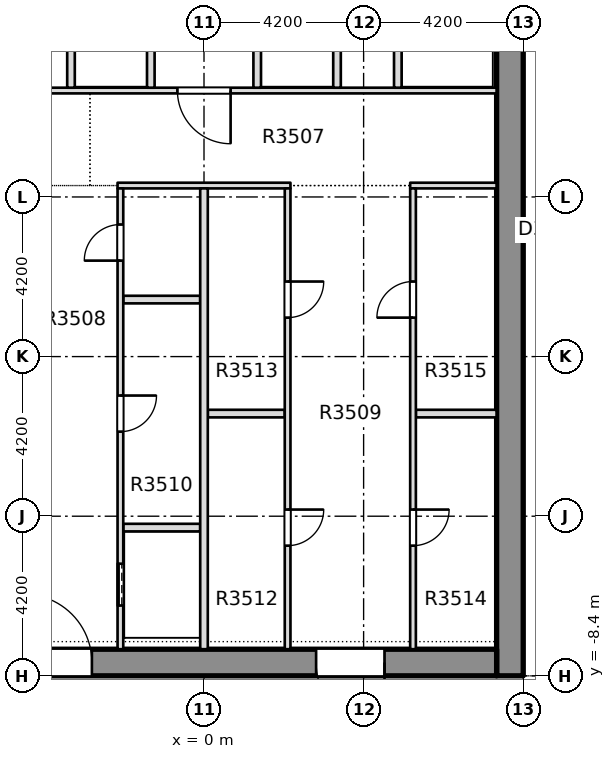
"""IFC4 building model, lengths in metres.
Left out: names, types, materials, properties, quantities, classifications, styles, units other than length and angle.
Written with IfcOpenShell. Run it as: python <this file> out.ifc"""

import sys

from ifc_helpers import new_model, si_unit, direction, frame, frame_2d, origin, place, context, subcontext, project, spatial, rectangle, extrude, element, fill, save


model = new_model("IFC4")
c1 = context("Model", 3, precision=1e-05, world=origin(), true_north=direction((0.0, 1.0)))
c2 = subcontext(c1, "Body", "Model", "MODEL_VIEW")
j1 = project(units=[si_unit("LENGTHUNIT", "METRE"), si_unit("PLANEANGLEUNIT", "RADIAN")], contexts=[c1])
p1 = place(None, origin())
s1 = spatial("IfcSite", under=j1, at=p1, CompositionType="ELEMENT")
p2 = place(p1, origin())
s2 = spatial("IfcBuilding", under=s1, at=p2, CompositionType="ELEMENT")
p3 = place(p2, frame((0.0, 0.0, 140.0)))
s3 = spatial("IfcBuildingStorey", under=s2, at=p3, CompositionType="ELEMENT", Elevation=140.0)
p4 = place(p3, frame((8.05, -8.4, -0.4), z_axis=(0.0, 0.0, 1.0), x_axis=(0.0, 1.0, 0.0)))
e1 = element("IfcWall", 1, at=p4, inside=s3, PredefinedType="SOLIDWALL", context=c2, shape_type="SweptSolid", body=[
    extrude(rectangle(XDim=30.15, YDim=0.7, at=frame_2d((15.075, 0.0))), origin(), (0.0, 0.0, 1.0), 3.45),
])
p5 = place(p4, frame((19.3, 0.0, 0.4)))
e2 = element("IfcOpeningElement", 2, at=p5, cuts=e1, PredefinedType="OPENING", context=c2, shape_type="SweptSolid", body=[
    extrude(rectangle(XDim=1.2, YDim=2.1, at=frame_2d((0.6, 1.05))), frame((0.0, 0.36, 0.0), z_axis=(0.0, -1.0, 0.0), x_axis=(1.0, 0.0, 0.0)), (0.0, 0.0, 1.0), 0.72),
])
p6 = place(p3, frame((-7.7, -8.05, -0.4), z_axis=(0.0, 0.0, 1.0), x_axis=(1.0, 0.0, 0.0)))
e3 = element("IfcWall", 3, at=p6, inside=s3, PredefinedType="SHEAR", context=c2, shape_type="SweptSolid", body=[
    extrude(rectangle(XDim=15.4, YDim=0.7, at=frame_2d((7.7, 0.0))), origin(), (0.0, 0.0, 1.0), 3.45),
])
p7 = place(p6, frame((2.95, 0.0, 0.4)))
e4 = element("IfcOpeningElement", 4, at=p7, cuts=e3, PredefinedType="OPENING", context=c2, shape_type="SweptSolid", body=[
    extrude(rectangle(XDim=1.8, YDim=2.1, at=frame_2d((0.9, 1.05))), frame((0.0, 0.36, 0.0), z_axis=(0.0, -1.0, 0.0), x_axis=(1.0, 0.0, 0.0)), (0.0, 0.0, 1.0), 0.72),
])
p8 = place(p6, frame((10.65, 0.0, 0.4)))
e5 = element("IfcOpeningElement", 5, at=p8, cuts=e3, PredefinedType="OPENING", context=c2, shape_type="SweptSolid", body=[
    extrude(rectangle(XDim=1.8, YDim=2.1, at=frame_2d((0.9, 1.05))), frame((0.0, 0.36, 0.0), z_axis=(0.0, -1.0, 0.0), x_axis=(1.0, 0.0, 0.0)), (0.0, 0.0, 1.0), 0.72),
])
for number, where, z_axis, x_axis in (
    (6, (-2.125, -4.5, 0.0), (0.0, 0.0, 1.0), (1.0, 0.0, 0.0)),
    (7, (0.1, -1.5, 0.0), (0.0, 0.0, 1.0), (1.0, 0.0, 0.0)),
):
    element("IfcWall", number, at=place(p3, frame(where, z_axis=z_axis, x_axis=x_axis)), inside=s3, PredefinedType="PARTITIONING", context=c2, shape_type="SweptSolid", body=[
        extrude(rectangle(XDim=2.025, YDim=0.2, at=frame_2d((1.012, 0.0))), origin(), (0.0, 0.0, 1.0), 3.05),
    ])
p9 = place(p3, frame((5.575, -1.5, 0.0), z_axis=(0.0, 0.0, 1.0), x_axis=(1.0, 0.0, 0.0)))
e8 = element("IfcWall", 8, at=p9, inside=s3, PredefinedType="PARTITIONING", context=c2, shape_type="SweptSolid", body=[
    extrude(rectangle(XDim=2.124, YDim=0.2, at=frame_2d((1.062, 0.0))), origin(), (0.0, 0.0, 1.0), 3.05),
])
p10 = place(p3, frame((-2.125, 1.5, 0.0), z_axis=(0.0, 0.0, 1.0), x_axis=(1.0, 0.0, 0.0)))
e9 = element("IfcWall", 9, at=p10, inside=s3, PredefinedType="PARTITIONING", context=c2, shape_type="SweptSolid", body=[
    extrude(rectangle(XDim=2.025, YDim=0.2, at=frame_2d((1.012, 0.0))), origin(), (0.0, 0.0, 1.0), 3.05),
])
p11 = place(p3, frame((-2.275, 4.5, 0.0), z_axis=(0.0, 0.0, 1.0), x_axis=(1.0, 0.0, 0.0)))
e10 = element("IfcWall", 10, at=p11, inside=s3, PredefinedType="PARTITIONING", context=c2, shape_type="SweptSolid", body=[
    extrude(rectangle(XDim=4.55, YDim=0.15, at=frame_2d((2.275, 0.0))), origin(), (0.0, 0.0, 1.0), 3.05),
])
p12 = place(p3, frame((5.425, 4.5, 0.0), z_axis=(0.0, 0.0, 1.0), x_axis=(1.0, 0.0, 0.0)))
e11 = element("IfcWall", 11, at=p12, inside=s3, PredefinedType="PARTITIONING", context=c2, shape_type="SweptSolid", body=[
    extrude(rectangle(XDim=2.274, YDim=0.15, at=frame_2d((1.137, 0.0))), origin(), (0.0, 0.0, 1.0), 3.05),
])
p13 = place(p3, frame((-7.699, 7.0, 0.0), z_axis=(0.0, 0.0, 1.0), x_axis=(1.0, 0.0, 0.0)))
e12 = element("IfcWall", 12, at=p13, inside=s3, PredefinedType="PARTITIONING", context=c2, shape_type="SweptSolid", body=[
    extrude(rectangle(XDim=15.398, YDim=0.15, at=frame_2d((7.699, 0.0))), origin(), (0.0, 0.0, 1.0), 3.05),
])
p14 = place(p13, frame((6.999, 0.0, 0.0)))
e13 = element("IfcOpeningElement", 13, at=p14, cuts=e12, PredefinedType="OPENING", context=c2, shape_type="SweptSolid", body=[
    extrude(rectangle(XDim=1.4, YDim=2.1, at=frame_2d((0.7, 1.05))), frame((0.0, 0.085, 0.0), z_axis=(0.0, -1.0, 0.0), x_axis=(1.0, 0.0, 0.0)), (0.0, 0.0, 1.0), 0.17),
])
p15 = place(p3, frame((-3.5, 7.075, 0.0), z_axis=(0.0, 0.0, 1.0), x_axis=(0.0, 1.0, 0.0)))
e14 = element("IfcWall", 14, at=p15, inside=s3, PredefinedType="PARTITIONING", context=c2, shape_type="SweptSolid", body=[
    extrude(rectangle(XDim=2.85, YDim=0.2, at=frame_2d((1.425, 0.0))), origin(), (0.0, 0.0, 1.0), 3.05),
])
p16 = place(p3, frame((-2.2, -7.699, 0.0), z_axis=(0.0, 0.0, 1.0), x_axis=(0.0, 1.0, 0.0)))
e15 = element("IfcWall", 15, at=p16, inside=s3, PredefinedType="PARTITIONING", context=c2, shape_type="SweptSolid", body=[
    extrude(rectangle(XDim=12.124, YDim=0.15, at=frame_2d((6.062, 0.0))), origin(), (0.0, 0.0, 1.0), 3.05),
])
p17 = place(p16, frame((1.149, 0.0, 0.0)))
e16 = element("IfcOpeningElement", 16, at=p17, cuts=e15, PredefinedType="OPENING", context=c2, shape_type="SweptSolid", body=[
    extrude(rectangle(XDim=1.1, YDim=2.1, at=frame_2d((0.55, 1.05))), frame((0.0, 0.085, 0.0), z_axis=(0.0, -1.0, 0.0), x_axis=(1.0, 0.0, 0.0)), (0.0, 0.0, 1.0), 0.17),
])
p18 = place(p16, frame((5.724, 0.0, 0.0)))
e17 = element("IfcOpeningElement", 17, at=p18, cuts=e15, PredefinedType="OPENING", context=c2, shape_type="SweptSolid", body=[
    extrude(rectangle(XDim=0.95, YDim=2.1, at=frame_2d((0.475, 1.05))), frame((0.0, 0.085, 0.0), z_axis=(0.0, -1.0, 0.0), x_axis=(1.0, 0.0, 0.0)), (0.0, 0.0, 1.0), 0.17),
])
p19 = place(p16, frame((10.224, 0.0, 0.0)))
e18 = element("IfcOpeningElement", 18, at=p19, cuts=e15, PredefinedType="OPENING", context=c2, shape_type="SweptSolid", body=[
    extrude(rectangle(XDim=0.95, YDim=2.1, at=frame_2d((0.475, 1.05))), frame((0.0, 0.085, 0.0), z_axis=(0.0, -1.0, 0.0), x_axis=(1.0, 0.0, 0.0)), (0.0, 0.0, 1.0), 0.17),
])
p20 = place(p3, frame((-1.4, 7.075, 0.0), z_axis=(0.0, 0.0, 1.0), x_axis=(0.0, 1.0, 0.0)))
e19 = element("IfcWall", 19, at=p20, inside=s3, PredefinedType="PARTITIONING", context=c2, shape_type="SweptSolid", body=[
    extrude(rectangle(XDim=2.85, YDim=0.2, at=frame_2d((1.425, 0.0))), origin(), (0.0, 0.0, 1.0), 3.05),
])
p21 = place(p3, frame((0.0, -7.699, 0.0), z_axis=(0.0, 0.0, 1.0), x_axis=(0.0, 1.0, 0.0)))
e20 = element("IfcWall", 20, at=p21, inside=s3, PredefinedType="PARTITIONING", context=c2, shape_type="SweptSolid", body=[
    extrude(rectangle(XDim=12.124, YDim=0.2, at=frame_2d((6.062, 0.0))), origin(), (0.0, 0.0, 1.0), 3.05),
])
p22 = place(p3, frame((1.4, 7.075, 0.0), z_axis=(0.0, 0.0, 1.0), x_axis=(0.0, 1.0, 0.0)))
e21 = element("IfcWall", 21, at=p22, inside=s3, PredefinedType="PARTITIONING", context=c2, shape_type="SweptSolid", body=[
    extrude(rectangle(XDim=2.85, YDim=0.2, at=frame_2d((1.425, 0.0))), origin(), (0.0, 0.0, 1.0), 3.05),
])
p23 = place(p3, frame((2.2, -7.699, 0.0), z_axis=(0.0, 0.0, 1.0), x_axis=(0.0, 1.0, 0.0)))
e22 = element("IfcWall", 22, at=p23, inside=s3, PredefinedType="PARTITIONING", context=c2, shape_type="SweptSolid", body=[
    extrude(rectangle(XDim=12.124, YDim=0.15, at=frame_2d((6.062, 0.0))), origin(), (0.0, 0.0, 1.0), 3.05),
])
p24 = place(p23, frame((2.724, 0.0, 0.0)))
e23 = element("IfcOpeningElement", 23, at=p24, cuts=e22, PredefinedType="OPENING", context=c2, shape_type="SweptSolid", body=[
    extrude(rectangle(XDim=0.95, YDim=2.1, at=frame_2d((0.475, 1.05))), frame((0.0, 0.085, 0.0), z_axis=(0.0, -1.0, 0.0), x_axis=(1.0, 0.0, 0.0)), (0.0, 0.0, 1.0), 0.17),
])
p25 = place(p23, frame((8.724, 0.0, 0.0)))
e24 = element("IfcOpeningElement", 24, at=p25, cuts=e22, PredefinedType="OPENING", context=c2, shape_type="SweptSolid", body=[
    extrude(rectangle(XDim=0.95, YDim=2.1, at=frame_2d((0.475, 1.05))), frame((0.0, 0.085, 0.0), z_axis=(0.0, -1.0, 0.0), x_axis=(1.0, 0.0, 0.0)), (0.0, 0.0, 1.0), 0.17),
])
p26 = place(p3, frame((3.5, 7.075, 0.0), z_axis=(0.0, 0.0, 1.0), x_axis=(0.0, 1.0, 0.0)))
e25 = element("IfcWall", 25, at=p26, inside=s3, PredefinedType="PARTITIONING", context=c2, shape_type="SweptSolid", body=[
    extrude(rectangle(XDim=2.85, YDim=0.2, at=frame_2d((1.425, 0.0))), origin(), (0.0, 0.0, 1.0), 3.05),
])
p27 = place(p3, frame((5.1, 7.075, 0.0), z_axis=(0.0, 0.0, 1.0), x_axis=(0.0, 1.0, 0.0)))
e26 = element("IfcWall", 26, at=p27, inside=s3, PredefinedType="PARTITIONING", context=c2, shape_type="SweptSolid", body=[
    extrude(rectangle(XDim=2.725, YDim=0.2, at=frame_2d((1.363, 0.0))), origin(), (0.0, 0.0, 1.0), 3.05),
])
p28 = place(p3, frame((5.5, -7.699, 0.0), z_axis=(0.0, 0.0, 1.0), x_axis=(0.0, 1.0, 0.0)))
e27 = element("IfcWall", 27, at=p28, inside=s3, PredefinedType="PARTITIONING", context=c2, shape_type="SweptSolid", body=[
    extrude(rectangle(XDim=12.124, YDim=0.15, at=frame_2d((6.062, 0.0))), origin(), (0.0, 0.0, 1.0), 3.05),
])
p29 = place(p28, frame((2.724, 0.0, 0.0)))
e28 = element("IfcOpeningElement", 28, at=p29, cuts=e27, PredefinedType="OPENING", context=c2, shape_type="SweptSolid", body=[
    extrude(rectangle(XDim=0.95, YDim=2.1, at=frame_2d((0.475, 1.05))), frame((0.0, 0.085, 0.0), z_axis=(0.0, -1.0, 0.0), x_axis=(1.0, 0.0, 0.0)), (0.0, 0.0, 1.0), 0.17),
])
p30 = place(p28, frame((8.724, 0.0, 0.0)))
e29 = element("IfcOpeningElement", 29, at=p30, cuts=e27, PredefinedType="OPENING", context=c2, shape_type="SweptSolid", body=[
    extrude(rectangle(XDim=0.95, YDim=2.1, at=frame_2d((0.475, 1.05))), frame((0.0, 0.085, 0.0), z_axis=(0.0, -1.0, 0.0), x_axis=(1.0, 0.0, 0.0)), (0.0, 0.0, 1.0), 0.17),
])
p31 = place(p17, origin())
e30 = element("IfcDoor", 30, at=p31, inside=s3, OperationType="SLIDING_TO_LEFT", PredefinedType="DOOR", context=c2, shape_type="SweptSolid", body=[
    extrude(rectangle(XDim=1.1, YDim=2.1, at=frame_2d((0.55, 1.05))), frame((0.0, 0.025, 0.0), z_axis=(0.0, -1.0, 0.0), x_axis=(1.0, 0.0, 0.0)), (0.0, 0.0, 1.0), 0.05),
])
fill(e16, e30)
p32 = place(p18, origin())
e31 = element("IfcDoor", 31, at=p32, inside=s3, OperationType="SINGLE_SWING_LEFT", PredefinedType="DOOR", context=c2, shape_type="SweptSolid", body=[
    extrude(rectangle(XDim=0.95, YDim=2.1, at=frame_2d((0.475, 1.05))), frame((0.0, 0.025, 0.0), z_axis=(0.0, -1.0, 0.0), x_axis=(1.0, 0.0, 0.0)), (0.0, 0.0, 1.0), 0.05),
])
fill(e17, e31)
p33 = place(p19, origin())
e32 = element("IfcDoor", 32, at=p33, inside=s3, OperationType="SINGLE_SWING_RIGHT", PredefinedType="DOOR", context=c2, shape_type="SweptSolid", body=[
    extrude(rectangle(XDim=0.95, YDim=2.1, at=frame_2d((0.475, 1.05))), frame((0.0, 0.025, 0.0), z_axis=(0.0, -1.0, 0.0), x_axis=(1.0, 0.0, 0.0)), (0.0, 0.0, 1.0), 0.05),
])
fill(e18, e32)
p34 = place(p24, origin())
e33 = element("IfcDoor", 33, at=p34, inside=s3, OperationType="SINGLE_SWING_RIGHT", PredefinedType="DOOR", context=c2, shape_type="SweptSolid", body=[
    extrude(rectangle(XDim=0.95, YDim=2.1, at=frame_2d((0.475, 1.05))), frame((0.0, 0.025, 0.0), z_axis=(0.0, -1.0, 0.0), x_axis=(1.0, 0.0, 0.0)), (0.0, 0.0, 1.0), 0.05),
])
fill(e23, e33)
p35 = place(p25, origin())
e34 = element("IfcDoor", 34, at=p35, inside=s3, OperationType="SINGLE_SWING_RIGHT", PredefinedType="DOOR", context=c2, shape_type="SweptSolid", body=[
    extrude(rectangle(XDim=0.95, YDim=2.1, at=frame_2d((0.475, 1.05))), frame((0.0, 0.025, 0.0), z_axis=(0.0, -1.0, 0.0), x_axis=(1.0, 0.0, 0.0)), (0.0, 0.0, 1.0), 0.05),
])
fill(e24, e34)
p36 = place(p29, origin())
e35 = element("IfcDoor", 35, at=p36, inside=s3, OperationType="SINGLE_SWING_LEFT", PredefinedType="DOOR", context=c2, shape_type="SweptSolid", body=[
    extrude(rectangle(XDim=0.95, YDim=2.1, at=frame_2d((0.475, 1.05))), frame((0.0, 0.025, 0.0), z_axis=(0.0, -1.0, 0.0), x_axis=(1.0, 0.0, 0.0)), (0.0, 0.0, 1.0), 0.05),
])
fill(e28, e35)
p37 = place(p30, origin())
e36 = element("IfcDoor", 36, at=p37, inside=s3, OperationType="SINGLE_SWING_LEFT", PredefinedType="DOOR", context=c2, shape_type="SweptSolid", body=[
    extrude(rectangle(XDim=0.95, YDim=2.1, at=frame_2d((0.475, 1.05))), frame((0.0, 0.025, 0.0), z_axis=(0.0, -1.0, 0.0), x_axis=(1.0, 0.0, 0.0)), (0.0, 0.0, 1.0), 0.05),
])
fill(e29, e36)
p38 = place(p14, origin())
e37 = element("IfcDoor", 37, at=p38, inside=s3, OperationType="SINGLE_SWING_RIGHT", PredefinedType="DOOR", context=c2, shape_type="SweptSolid", body=[
    extrude(rectangle(XDim=1.4, YDim=2.1, at=frame_2d((0.7, 1.05))), frame((0.0, 0.025, 0.0), z_axis=(0.0, -1.0, 0.0), x_axis=(1.0, 0.0, 0.0)), (0.0, 0.0, 1.0), 0.05),
])
fill(e13, e37)
p39 = place(p7, origin())
e38 = element("IfcDoor", 38, at=p39, inside=s3, OperationType="SINGLE_SWING_LEFT", PredefinedType="DOOR", context=c2, shape_type="SweptSolid", body=[
    extrude(rectangle(XDim=1.8, YDim=2.1, at=frame_2d((0.9, 1.05))), frame((0.0, 0.025, 0.0), z_axis=(0.0, -1.0, 0.0), x_axis=(1.0, 0.0, 0.0)), (0.0, 0.0, 1.0), 0.05),
])
fill(e4, e38)
p40 = place(p8, origin())
e39 = element("IfcDoor", 39, at=p40, inside=s3, OperationType="SINGLE_SWING_LEFT", PredefinedType="DOOR", context=c2, shape_type="SweptSolid", body=[
    extrude(rectangle(XDim=1.8, YDim=2.1, at=frame_2d((0.9, 1.05))), frame((0.0, 0.025, 0.0), z_axis=(0.0, -1.0, 0.0), x_axis=(1.0, 0.0, 0.0)), (0.0, 0.0, 1.0), 0.05),
])
fill(e5, e39)
save(model, sys.argv[1])
